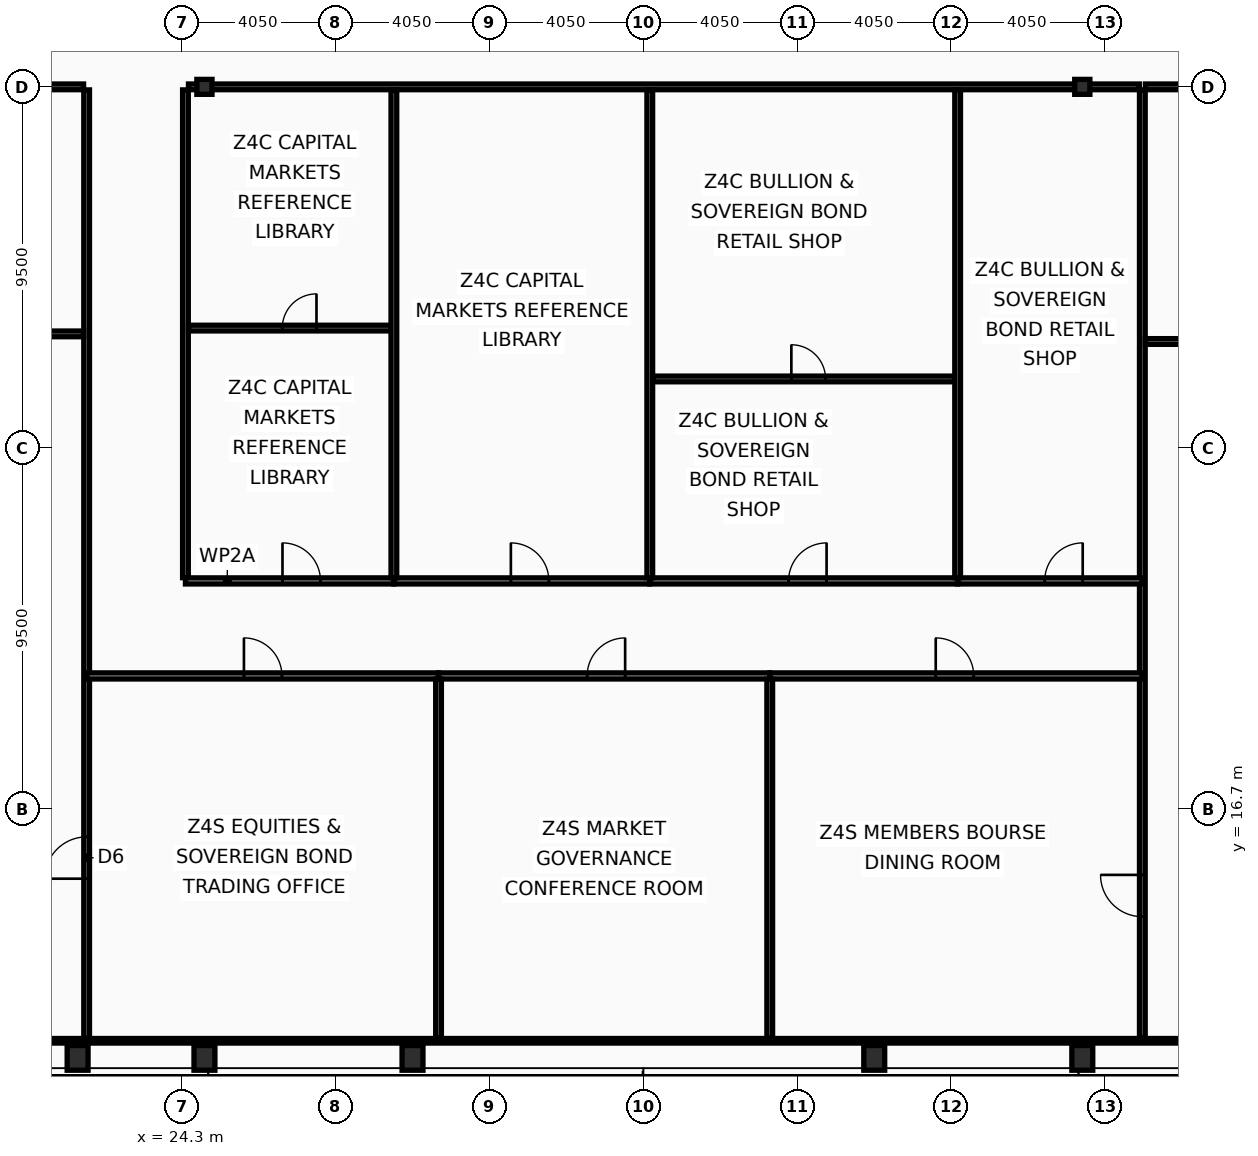
"""IFC4 building model, lengths in metres.
Left out: names, types, materials, properties, quantities, classifications, styles, units other than length and angle.
Written with IfcOpenShell. Run it as: python <this file> out.ifc"""

import sys

from ifc_helpers import new_model, si_unit, direction, frame, frame_2d, origin, origin_2d, place, context, subcontext, project, spatial, rectangle, hollow_rectangle, i_section, extrude, element, fill, save


model = new_model("IFC4")
c1 = context("Model", 3, precision=1e-05, world=origin(), true_north=direction((0.0, 1.0)))
c2 = subcontext(c1, "Body", "Model", "MODEL_VIEW")
j1 = project(units=[si_unit("LENGTHUNIT", "METRE"), si_unit("PLANEANGLEUNIT", "RADIAN")], contexts=[c1])
p1 = place(None, origin())
s1 = spatial("IfcSite", under=j1, at=p1, CompositionType="ELEMENT")
p2 = place(p1, origin())
s2 = spatial("IfcBuilding", under=s1, at=p2, CompositionType="ELEMENT")
p3 = place(p2, frame((0.0, 0.0, 302.2)))
s3 = spatial("IfcBuildingStorey", under=s2, at=p3, CompositionType="ELEMENT", Elevation=302.2)
for number, where, z_axis, x_axis in (
    (1, (21.562, 10.15, 0.0), (0.0, 0.0, 1.0), (1.0, 0.0, 0.0)),
    (2, (24.9, 10.15, 0.0), (0.0, 0.0, 1.0), (1.0, 0.0, 0.0)),
    (3, (30.375, 10.15, 0.0), (0.0, 0.0, 1.0), (1.0, 0.0, 0.0)),
    (4, (42.525, 10.15, 0.0), (0.0, 0.0, 1.0), (1.0, 0.0, 0.0)),
    (5, (48.0, 10.15, 0.0), (0.0, 0.0, 1.0), (1.0, 0.0, 0.0)),
):
    element("IfcColumn", number, at=place(p3, frame(where, z_axis=z_axis, x_axis=x_axis)), inside=s3, PredefinedType="COLUMN", context=c2, shape_type="SweptSolid", body=[
        extrude(hollow_rectangle(XDim=0.55, YDim=0.65, WallThickness=0.04, at=origin_2d()), origin(), (0.0, 0.0, 1.0), 3.6),
    ])
for number, where, z_axis, x_axis in (
    (6, (24.9, 35.7, 0.0), (0.0, 0.0, 1.0), (1.0, 0.0, 0.0)),
    (7, (48.0, 35.7, 0.0), (0.0, 0.0, 1.0), (1.0, 0.0, 0.0)),
):
    element("IfcColumn", number, at=place(p3, frame(where, z_axis=z_axis, x_axis=x_axis)), inside=s3, PredefinedType="COLUMN", context=c2, shape_type="SweptSolid", body=[
        extrude(i_section(OverallWidth=0.399, OverallDepth=0.393, WebThickness=0.023, FlangeThickness=0.037, at=origin_2d()), origin(), (0.0, 0.0, 1.0), 3.6),
    ])
p4 = place(p3, frame((21.8, 10.665, 0.0), z_axis=(0.0, 0.0, 1.0), x_axis=(0.0, 1.0, 0.0)))
e8 = element("IfcWall", 8, at=p4, inside=s3, PredefinedType="PARTITIONING", context=c2, shape_type="SweptSolid", body=[
    extrude(rectangle(XDim=24.955, YDim=0.15, at=frame_2d((12.478, 0.0))), origin(), (0.0, 0.0, 1.0), 2.97),
])
p5 = place(p4, frame((4.2, 0.0, 0.0)))
e9 = element("IfcOpeningElement", 9, at=p5, cuts=e8, PredefinedType="OPENING", context=c2, shape_type="SweptSolid", body=[
    extrude(rectangle(XDim=1.1, YDim=2.1, at=frame_2d((0.55, 1.05))), frame((0.0, 0.085, 0.0), z_axis=(0.0, -1.0, 0.0), x_axis=(1.0, 0.0, 0.0)), (0.0, 0.0, 1.0), 0.17),
])
p6 = place(p3, frame((12.095, 35.7, 0.0), z_axis=(0.0, 0.0, 1.0), x_axis=(1.0, 0.0, 0.0)))
e10 = element("IfcWall", 10, at=p6, inside=s3, PredefinedType="PARTITIONING", context=c2, shape_type="SweptSolid", body=[
    extrude(rectangle(XDim=9.625, YDim=0.15, at=frame_2d((4.812, 0.0))), origin(), (0.0, 0.0, 1.0), 2.72),
])
p7 = place(p6, frame((2.8, 0.0, 0.0)))
e11 = element("IfcOpeningElement", 11, at=p7, cuts=e10, PredefinedType="OPENING", context=c2, shape_type="SweptSolid", body=[
    extrude(rectangle(XDim=1.0, YDim=2.05, at=frame_2d((0.5, 1.025))), frame((0.0, 0.085, 0.0), z_axis=(0.0, -1.0, 0.0), x_axis=(1.0, 0.0, 0.0)), (0.0, 0.0, 1.0), 0.17),
])
p8 = place(p3, frame((12.095, 29.2, 0.0), z_axis=(0.0, 0.0, 1.0), x_axis=(1.0, 0.0, 0.0)))
e12 = element("IfcWall", 12, at=p8, inside=s3, PredefinedType="PARTITIONING", context=c2, shape_type="SweptSolid", body=[
    extrude(rectangle(XDim=9.625, YDim=0.15, at=frame_2d((4.812, 0.0))), origin(), (0.0, 0.0, 1.0), 2.72),
])
p9 = place(p8, frame((2.2, 0.0, 0.0)))
e13 = element("IfcOpeningElement", 13, at=p9, cuts=e12, PredefinedType="OPENING", context=c2, shape_type="SweptSolid", body=[
    extrude(rectangle(XDim=0.9, YDim=2.05, at=frame_2d((0.45, 1.025))), frame((0.0, 0.085, 0.0), z_axis=(0.0, -1.0, 0.0), x_axis=(1.0, 0.0, 0.0)), (0.0, 0.0, 1.0), 0.17),
])
p10 = place(p3, frame((24.4, 22.785, 0.0), z_axis=(0.0, 0.0, 1.0), x_axis=(0.0, 1.0, 0.0)))
e14 = element("IfcWall", 14, at=p10, inside=s3, PredefinedType="PARTITIONING", context=c2, shape_type="SweptSolid", body=[
    extrude(rectangle(XDim=12.835, YDim=0.15, at=frame_2d((6.417, 0.0))), origin(), (0.0, 0.0, 1.0), 2.72),
])
p11 = place(p3, frame((49.58, 10.665, 0.0), z_axis=(0.0, 0.0, 1.0), x_axis=(0.0, 1.0, 0.0)))
e15 = element("IfcWall", 15, at=p11, inside=s3, PredefinedType="PARTITIONING", context=c2, shape_type="SweptSolid", body=[
    extrude(rectangle(XDim=24.955, YDim=0.15, at=frame_2d((12.478, 0.0))), origin(), (0.0, 0.0, 1.0), 2.97),
])
p12 = place(p11, frame((3.2, 0.0, 0.0)))
e16 = element("IfcOpeningElement", 16, at=p12, cuts=e15, PredefinedType="OPENING", context=c2, shape_type="SweptSolid", body=[
    extrude(rectangle(XDim=1.1, YDim=2.1, at=frame_2d((0.55, 1.05))), frame((0.0, 0.085, 0.0), z_axis=(0.0, -1.0, 0.0), x_axis=(1.0, 0.0, 0.0)), (0.0, 0.0, 1.0), 0.17),
])
p13 = place(p3, frame((24.48, 35.7, 0.0), z_axis=(0.0, 0.0, 1.0), x_axis=(1.0, 0.0, 0.0)))
e17 = element("IfcWall", 17, at=p13, inside=s3, PredefinedType="PARTITIONING", context=c2, shape_type="SweptSolid", body=[
    extrude(rectangle(XDim=25.02, YDim=0.15, at=frame_2d((12.51, 0.0))), origin(), (0.0, 0.0, 1.0), 2.72),
])
p14 = place(p3, frame((49.66, 35.7, 0.0), z_axis=(0.0, 0.0, 1.0), x_axis=(1.0, 0.0, 0.0)))
e18 = element("IfcWall", 18, at=p14, inside=s3, PredefinedType="PARTITIONING", context=c2, shape_type="SweptSolid", body=[
    extrude(rectangle(XDim=11.145, YDim=0.15, at=frame_2d((5.573, 0.0))), origin(), (0.0, 0.0, 1.0), 2.72),
])
p15 = place(p14, frame((2.2, 0.0, 0.0)))
e19 = element("IfcOpeningElement", 19, at=p15, cuts=e18, PredefinedType="OPENING", context=c2, shape_type="SweptSolid", body=[
    extrude(rectangle(XDim=1.0, YDim=2.05, at=frame_2d((0.5, 1.025))), frame((0.0, 0.085, 0.0), z_axis=(0.0, -1.0, 0.0), x_axis=(1.0, 0.0, 0.0)), (0.0, 0.0, 1.0), 0.17),
])
p16 = place(p3, frame((49.66, 29.0, 0.0), z_axis=(0.0, 0.0, 1.0), x_axis=(1.0, 0.0, 0.0)))
e20 = element("IfcWall", 20, at=p16, inside=s3, PredefinedType="PARTITIONING", context=c2, shape_type="SweptSolid", body=[
    extrude(rectangle(XDim=11.145, YDim=0.15, at=frame_2d((5.573, 0.0))), origin(), (0.0, 0.0, 1.0), 2.72),
])
p17 = place(p16, frame((2.2, 0.0, 0.0)))
e21 = element("IfcOpeningElement", 21, at=p17, cuts=e20, PredefinedType="OPENING", context=c2, shape_type="SweptSolid", body=[
    extrude(rectangle(XDim=0.9, YDim=2.05, at=frame_2d((0.45, 1.025))), frame((0.0, 0.085, 0.0), z_axis=(0.0, -1.0, 0.0), x_axis=(1.0, 0.0, 0.0)), (0.0, 0.0, 1.0), 0.17),
])
p18 = place(p3, frame((24.4, 22.7, 0.0), z_axis=(0.0, 0.0, 1.0), x_axis=(1.0, 0.0, 0.0)))
e22 = element("IfcWall", 22, at=p18, inside=s3, PredefinedType="PARTITIONING", context=c2, shape_type="SweptSolid", body=[
    extrude(rectangle(XDim=5.485, YDim=0.16, at=frame_2d((2.743, 0.0))), origin(), (0.0, 0.0, 1.0), 2.72),
])
p19 = place(p18, frame((2.554, 0.0, 0.0)))
e23 = element("IfcOpeningElement", 23, at=p19, cuts=e22, PredefinedType="OPENING", context=c2, shape_type="SweptSolid", body=[
    extrude(rectangle(XDim=1.0, YDim=2.05, at=frame_2d((0.5, 1.025))), frame((0.0, 0.09, 0.0), z_axis=(0.0, -1.0, 0.0), x_axis=(1.0, 0.0, 0.0)), (0.0, 0.0, 1.0), 0.18),
])
p20 = place(p3, frame((24.48, 29.353, 0.0), z_axis=(0.0, 0.0, 1.0), x_axis=(1.0, 0.0, 0.0)))
e24 = element("IfcWall", 24, at=p20, inside=s3, PredefinedType="PARTITIONING", context=c2, shape_type="SweptSolid", body=[
    extrude(rectangle(XDim=5.325, YDim=0.15, at=frame_2d((2.663, 0.0))), origin(), (0.0, 0.0, 1.0), 2.72),
])
p21 = place(p20, frame((2.468, 0.0, 0.0)))
e25 = element("IfcOpeningElement", 25, at=p21, cuts=e24, PredefinedType="OPENING", context=c2, shape_type="SweptSolid", body=[
    extrude(rectangle(XDim=0.9, YDim=2.05, at=frame_2d((0.45, 1.025))), frame((0.0, 0.085, 0.0), z_axis=(0.0, -1.0, 0.0), x_axis=(1.0, 0.0, 0.0)), (0.0, 0.0, 1.0), 0.17),
])
p22 = place(p3, frame((29.885, 22.7, 0.0), z_axis=(0.0, 0.0, 1.0), x_axis=(1.0, 0.0, 0.0)))
e26 = element("IfcWall", 26, at=p22, inside=s3, PredefinedType="PARTITIONING", context=c2, shape_type="SweptSolid", body=[
    extrude(rectangle(XDim=6.734, YDim=0.16, at=frame_2d((3.367, 0.0))), origin(), (0.0, 0.0, 1.0), 2.72),
])
p23 = place(p22, frame((3.078, 0.0, 0.0)))
e27 = element("IfcOpeningElement", 27, at=p23, cuts=e26, PredefinedType="OPENING", context=c2, shape_type="SweptSolid", body=[
    extrude(rectangle(XDim=1.0, YDim=2.05, at=frame_2d((0.5, 1.025))), frame((0.0, 0.09, 0.0), z_axis=(0.0, -1.0, 0.0), x_axis=(1.0, 0.0, 0.0)), (0.0, 0.0, 1.0), 0.18),
])
p24 = place(p3, frame((29.885, 22.785, 0.0), z_axis=(0.0, 0.0, 1.0), x_axis=(0.0, 1.0, 0.0)))
e28 = element("IfcWall", 28, at=p24, inside=s3, PredefinedType="PARTITIONING", context=c2, shape_type="SweptSolid", body=[
    extrude(rectangle(XDim=12.835, YDim=0.15, at=frame_2d((6.417, 0.0))), origin(), (0.0, 0.0, 1.0), 2.72),
])
p25 = place(p3, frame((36.619, 22.7, 0.0), z_axis=(0.0, 0.0, 1.0), x_axis=(1.0, 0.0, 0.0)))
e29 = element("IfcWall", 29, at=p25, inside=s3, PredefinedType="PARTITIONING", context=c2, shape_type="SweptSolid", body=[
    extrude(rectangle(XDim=8.101, YDim=0.16, at=frame_2d((4.05, 0.0))), origin(), (0.0, 0.0, 1.0), 2.72),
])
p26 = place(p25, frame((3.652, 0.0, 0.0)))
e30 = element("IfcOpeningElement", 30, at=p26, cuts=e29, PredefinedType="OPENING", context=c2, shape_type="SweptSolid", body=[
    extrude(rectangle(XDim=1.0, YDim=2.05, at=frame_2d((0.5, 1.025))), frame((0.0, 0.09, 0.0), z_axis=(0.0, -1.0, 0.0), x_axis=(1.0, 0.0, 0.0)), (0.0, 0.0, 1.0), 0.18),
])
p27 = place(p3, frame((36.619, 22.785, 0.0), z_axis=(0.0, 0.0, 1.0), x_axis=(0.0, 1.0, 0.0)))
e31 = element("IfcWall", 31, at=p27, inside=s3, PredefinedType="PARTITIONING", context=c2, shape_type="SweptSolid", body=[
    extrude(rectangle(XDim=12.835, YDim=0.15, at=frame_2d((6.417, 0.0))), origin(), (0.0, 0.0, 1.0), 2.97),
])
p28 = place(p3, frame((36.699, 28.014, 0.0), z_axis=(0.0, 0.0, 1.0), x_axis=(1.0, 0.0, 0.0)))
e32 = element("IfcWall", 32, at=p28, inside=s3, PredefinedType="PARTITIONING", context=c2, shape_type="SweptSolid", body=[
    extrude(rectangle(XDim=7.941, YDim=0.15, at=frame_2d((3.97, 0.0))), origin(), (0.0, 0.0, 1.0), 2.72),
])
p29 = place(p28, frame((3.646, 0.0, 0.0)))
e33 = element("IfcOpeningElement", 33, at=p29, cuts=e32, PredefinedType="OPENING", context=c2, shape_type="SweptSolid", body=[
    extrude(rectangle(XDim=0.9, YDim=2.05, at=frame_2d((0.45, 1.025))), frame((0.0, 0.085, 0.0), z_axis=(0.0, -1.0, 0.0), x_axis=(1.0, 0.0, 0.0)), (0.0, 0.0, 1.0), 0.17),
])
p30 = place(p3, frame((44.719, 22.7, 0.0), z_axis=(0.0, 0.0, 1.0), x_axis=(1.0, 0.0, 0.0)))
e34 = element("IfcWall", 34, at=p30, inside=s3, PredefinedType="PARTITIONING", context=c2, shape_type="SweptSolid", body=[
    extrude(rectangle(XDim=4.861, YDim=0.16, at=frame_2d((2.43, 0.0))), origin(), (0.0, 0.0, 1.0), 2.72),
])
p31 = place(p30, frame((2.292, 0.0, 0.0)))
e35 = element("IfcOpeningElement", 35, at=p31, cuts=e34, PredefinedType="OPENING", context=c2, shape_type="SweptSolid", body=[
    extrude(rectangle(XDim=1.0, YDim=2.05, at=frame_2d((0.5, 1.025))), frame((0.0, 0.09, 0.0), z_axis=(0.0, -1.0, 0.0), x_axis=(1.0, 0.0, 0.0)), (0.0, 0.0, 1.0), 0.18),
])
p32 = place(p3, frame((44.719, 22.785, 0.0), z_axis=(0.0, 0.0, 1.0), x_axis=(0.0, 1.0, 0.0)))
e36 = element("IfcWall", 36, at=p32, inside=s3, PredefinedType="PARTITIONING", context=c2, shape_type="SweptSolid", body=[
    extrude(rectangle(XDim=12.835, YDim=0.15, at=frame_2d((6.417, 0.0))), origin(), (0.0, 0.0, 1.0), 2.97),
])
p33 = place(p3, frame((21.8, 20.2, 0.0), z_axis=(0.0, 0.0, 1.0), x_axis=(1.0, 0.0, 0.0)))
e37 = element("IfcWall", 37, at=p33, inside=s3, PredefinedType="PARTITIONING", context=c2, shape_type="SweptSolid", body=[
    extrude(rectangle(XDim=9.26, YDim=0.16, at=frame_2d((4.63, 0.0))), origin(), (0.0, 0.0, 1.0), 2.72),
])
p34 = place(p33, frame((4.139, 0.0, 0.0)))
e38 = element("IfcOpeningElement", 38, at=p34, cuts=e37, PredefinedType="OPENING", context=c2, shape_type="SweptSolid", body=[
    extrude(rectangle(XDim=1.0, YDim=2.05, at=frame_2d((0.5, 1.025))), frame((0.0, 0.09, 0.0), z_axis=(0.0, -1.0, 0.0), x_axis=(1.0, 0.0, 0.0)), (0.0, 0.0, 1.0), 0.18),
])
p35 = place(p3, frame((31.06, 20.2, 0.0), z_axis=(0.0, 0.0, 1.0), x_axis=(1.0, 0.0, 0.0)))
e39 = element("IfcWall", 39, at=p35, inside=s3, PredefinedType="PARTITIONING", context=c2, shape_type="SweptSolid", body=[
    extrude(rectangle(XDim=8.715, YDim=0.16, at=frame_2d((4.358, 0.0))), origin(), (0.0, 0.0, 1.0), 3.38),
])
p36 = place(p35, frame((3.91, 0.0, 0.0)))
e40 = element("IfcOpeningElement", 40, at=p36, cuts=e39, PredefinedType="OPENING", context=c2, shape_type="SweptSolid", body=[
    extrude(rectangle(XDim=1.0, YDim=2.05, at=frame_2d((0.5, 1.025))), frame((0.0, 0.09, 0.0), z_axis=(0.0, -1.0, 0.0), x_axis=(1.0, 0.0, 0.0)), (0.0, 0.0, 1.0), 0.18),
])
p37 = place(p3, frame((31.06, 10.665, 0.0), z_axis=(0.0, 0.0, 1.0), x_axis=(0.0, 1.0, 0.0)))
e41 = element("IfcWall", 41, at=p37, inside=s3, PredefinedType="PARTITIONING", context=c2, shape_type="SweptSolid", body=[
    extrude(rectangle(XDim=9.45, YDim=0.15, at=frame_2d((4.725, 0.0))), origin(), (0.0, 0.0, 1.0), 2.97),
])
p38 = place(p3, frame((39.775, 20.2, 0.0), z_axis=(0.0, 0.0, 1.0), x_axis=(1.0, 0.0, 0.0)))
e42 = element("IfcWall", 42, at=p38, inside=s3, PredefinedType="PARTITIONING", context=c2, shape_type="SweptSolid", body=[
    extrude(rectangle(XDim=9.805, YDim=0.16, at=frame_2d((4.902, 0.0))), origin(), (0.0, 0.0, 1.0), 2.72),
])
p39 = place(p38, frame((4.368, 0.0, 0.0)))
e43 = element("IfcOpeningElement", 43, at=p39, cuts=e42, PredefinedType="OPENING", context=c2, shape_type="SweptSolid", body=[
    extrude(rectangle(XDim=1.0, YDim=2.05, at=frame_2d((0.5, 1.025))), frame((0.0, 0.09, 0.0), z_axis=(0.0, -1.0, 0.0), x_axis=(1.0, 0.0, 0.0)), (0.0, 0.0, 1.0), 0.18),
])
p40 = place(p3, frame((39.775, 10.665, 0.0), z_axis=(0.0, 0.0, 1.0), x_axis=(0.0, 1.0, 0.0)))
e44 = element("IfcWall", 44, at=p40, inside=s3, PredefinedType="PARTITIONING", context=c2, shape_type="SweptSolid", body=[
    extrude(rectangle(XDim=9.45, YDim=0.15, at=frame_2d((4.725, 0.0))), origin(), (0.0, 0.0, 1.0), 2.97),
])
p41 = place(p3, frame((12.095, 10.6, 0.0), z_axis=(0.0, 0.0, 1.0), x_axis=(1.0, 0.0, 0.0)))
e45 = element("IfcWall", 45, at=p41, inside=s3, PredefinedType="PARTITIONING", context=c2, shape_type="SweptSolid", body=[
    extrude(rectangle(XDim=48.71, YDim=0.12, at=frame_2d((24.355, 0.0))), origin(), (0.0, 0.0, 1.0), 2.72),
])
p42 = place(p5, origin())
e46 = element("IfcDoor", 46, at=p42, inside=s3, OperationType="SINGLE_SWING_LEFT", PredefinedType="DOOR", context=c2, shape_type="SweptSolid", body=[
    extrude(rectangle(XDim=1.1, YDim=2.1, at=frame_2d((0.55, 1.05))), frame((0.0, 0.025, 0.0), z_axis=(0.0, -1.0, 0.0), x_axis=(1.0, 0.0, 0.0)), (0.0, 0.0, 1.0), 0.05),
])
fill(e9, e46)
p43 = place(p12, origin())
e47 = element("IfcDoor", 47, at=p43, inside=s3, OperationType="SINGLE_SWING_RIGHT", PredefinedType="DOOR", context=c2, shape_type="SweptSolid", body=[
    extrude(rectangle(XDim=1.1, YDim=2.1, at=frame_2d((0.55, 1.05))), frame((0.0, 0.025, 0.0), z_axis=(0.0, -1.0, 0.0), x_axis=(1.0, 0.0, 0.0)), (0.0, 0.0, 1.0), 0.05),
])
fill(e16, e47)
p44 = place(p19, origin())
e48 = element("IfcDoor", 48, at=p44, inside=s3, OperationType="SINGLE_SWING_LEFT", PredefinedType="DOOR", context=c2, shape_type="SweptSolid", body=[
    extrude(rectangle(XDim=1.0, YDim=2.05, at=frame_2d((0.5, 1.025))), frame((0.0, 0.025, 0.0), z_axis=(0.0, -1.0, 0.0), x_axis=(1.0, 0.0, 0.0)), (0.0, 0.0, 1.0), 0.05),
])
fill(e23, e48)
p45 = place(p21, origin())
e49 = element("IfcDoor", 49, at=p45, inside=s3, OperationType="SINGLE_SWING_RIGHT", PredefinedType="DOOR", context=c2, shape_type="SweptSolid", body=[
    extrude(rectangle(XDim=0.9, YDim=2.05, at=frame_2d((0.45, 1.025))), frame((0.0, 0.025, 0.0), z_axis=(0.0, -1.0, 0.0), x_axis=(1.0, 0.0, 0.0)), (0.0, 0.0, 1.0), 0.05),
])
fill(e25, e49)
p46 = place(p23, origin())
e50 = element("IfcDoor", 50, at=p46, inside=s3, OperationType="SINGLE_SWING_LEFT", PredefinedType="DOOR", context=c2, shape_type="SweptSolid", body=[
    extrude(rectangle(XDim=1.0, YDim=2.05, at=frame_2d((0.5, 1.025))), frame((0.0, 0.025, 0.0), z_axis=(0.0, -1.0, 0.0), x_axis=(1.0, 0.0, 0.0)), (0.0, 0.0, 1.0), 0.05),
])
fill(e27, e50)
p47 = place(p26, origin())
e51 = element("IfcDoor", 51, at=p47, inside=s3, OperationType="SINGLE_SWING_RIGHT", PredefinedType="DOOR", context=c2, shape_type="SweptSolid", body=[
    extrude(rectangle(XDim=1.0, YDim=2.05, at=frame_2d((0.5, 1.025))), frame((0.0, 0.025, 0.0), z_axis=(0.0, -1.0, 0.0), x_axis=(1.0, 0.0, 0.0)), (0.0, 0.0, 1.0), 0.05),
])
fill(e30, e51)
p48 = place(p29, origin())
e52 = element("IfcDoor", 52, at=p48, inside=s3, OperationType="SINGLE_SWING_LEFT", PredefinedType="DOOR", context=c2, shape_type="SweptSolid", body=[
    extrude(rectangle(XDim=0.9, YDim=2.05, at=frame_2d((0.45, 1.025))), frame((0.0, 0.025, 0.0), z_axis=(0.0, -1.0, 0.0), x_axis=(1.0, 0.0, 0.0)), (0.0, 0.0, 1.0), 0.05),
])
fill(e33, e52)
p49 = place(p31, origin())
e53 = element("IfcDoor", 53, at=p49, inside=s3, OperationType="SINGLE_SWING_RIGHT", PredefinedType="DOOR", context=c2, shape_type="SweptSolid", body=[
    extrude(rectangle(XDim=1.0, YDim=2.05, at=frame_2d((0.5, 1.025))), frame((0.0, 0.025, 0.0), z_axis=(0.0, -1.0, 0.0), x_axis=(1.0, 0.0, 0.0)), (0.0, 0.0, 1.0), 0.05),
])
fill(e35, e53)
p50 = place(p34, origin())
e54 = element("IfcDoor", 54, at=p50, inside=s3, OperationType="SINGLE_SWING_LEFT", PredefinedType="DOOR", context=c2, shape_type="SweptSolid", body=[
    extrude(rectangle(XDim=1.0, YDim=2.05, at=frame_2d((0.5, 1.025))), frame((0.0, 0.025, 0.0), z_axis=(0.0, -1.0, 0.0), x_axis=(1.0, 0.0, 0.0)), (0.0, 0.0, 1.0), 0.05),
])
fill(e38, e54)
p51 = place(p36, origin())
e55 = element("IfcDoor", 55, at=p51, inside=s3, OperationType="SINGLE_SWING_RIGHT", PredefinedType="DOOR", context=c2, shape_type="SweptSolid", body=[
    extrude(rectangle(XDim=1.0, YDim=2.05, at=frame_2d((0.5, 1.025))), frame((0.0, 0.025, 0.0), z_axis=(0.0, -1.0, 0.0), x_axis=(1.0, 0.0, 0.0)), (0.0, 0.0, 1.0), 0.05),
])
fill(e40, e55)
p52 = place(p39, origin())
e56 = element("IfcDoor", 56, at=p52, inside=s3, OperationType="SINGLE_SWING_LEFT", PredefinedType="DOOR", context=c2, shape_type="SweptSolid", body=[
    extrude(rectangle(XDim=1.0, YDim=2.05, at=frame_2d((0.5, 1.025))), frame((0.0, 0.025, 0.0), z_axis=(0.0, -1.0, 0.0), x_axis=(1.0, 0.0, 0.0)), (0.0, 0.0, 1.0), 0.05),
])
fill(e43, e56)
save(model, sys.argv[1])
